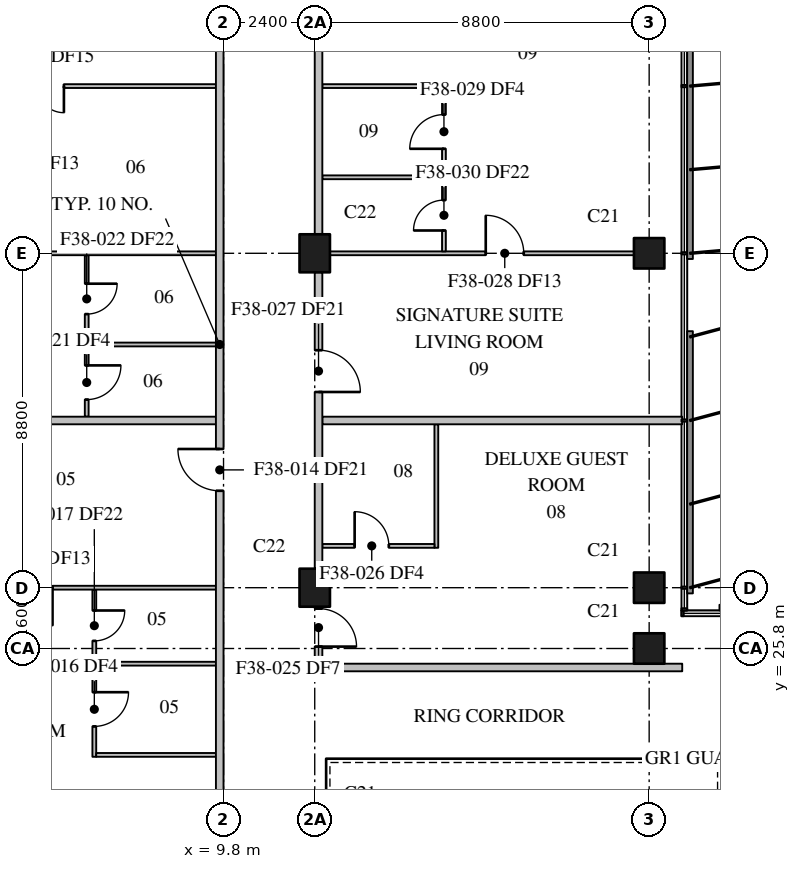
"""IFC4 building model, lengths in metres.
Left out: names, types, materials, properties, quantities, classifications, styles, units other than length and angle.
Written with IfcOpenShell. Run it as: python <this file> out.ifc"""

import sys

from ifc_helpers import new_model, si_unit, direction, frame, frame_2d, origin, origin_2d, place, context, subcontext, project, spatial, rectangle, extrude, element, fill, save


model = new_model("IFC4")
c1 = context("Model", 3, precision=1e-05, world=origin(), true_north=direction((0.0, 1.0)))
c2 = subcontext(c1, "Body", "Model", "MODEL_VIEW")
j1 = project(units=[si_unit("LENGTHUNIT", "METRE"), si_unit("PLANEANGLEUNIT", "RADIAN")], contexts=[c1])
p1 = place(None, origin())
s1 = spatial("IfcSite", under=j1, at=p1, CompositionType="ELEMENT")
p2 = place(p1, origin())
s2 = spatial("IfcBuilding", under=s1, at=p2, CompositionType="ELEMENT")
p3 = place(p2, frame((0.0, 0.0, 305.5)))
s3 = spatial("IfcBuildingStorey", under=s2, at=p3, CompositionType="ELEMENT", Elevation=305.5)
for number, where, z_axis, x_axis in (
    (1, (12.2, 27.4, 0.0), (0.0, 0.0, 1.0), (0.0, 1.0, 0.0)),
    (2, (12.2, 36.2, 0.0), (0.0, 0.0, 1.0), (0.0, 1.0, 0.0)),
):
    element("IfcColumn", number, at=place(p3, frame(where, z_axis=z_axis, x_axis=x_axis)), inside=s3, PredefinedType="COLUMN", context=c2, shape_type="SweptSolid", body=[
        extrude(rectangle(XDim=1.0, YDim=0.8, at=origin_2d()), origin(), (0.0, 0.0, 1.0), 3.7),
    ])
for number, where, z_axis, x_axis in (
    (3, (21.0, 25.8, 0.0), (0.0, 0.0, 1.0), (1.0, 0.0, 0.0)),
    (4, (21.0, 27.4, 0.0), (0.0, 0.0, 1.0), (1.0, 0.0, 0.0)),
    (5, (21.0, 36.2, 0.0), (0.0, 0.0, 1.0), (1.0, 0.0, 0.0)),
):
    element("IfcColumn", number, at=place(p3, frame(where, z_axis=z_axis, x_axis=x_axis)), inside=s3, PredefinedType="COLUMN", context=c2, shape_type="SweptSolid", body=[
        extrude(rectangle(XDim=0.8, YDim=0.8, at=origin_2d()), origin(), (0.0, 0.0, 1.0), 3.7),
    ])
p4 = place(p3, frame((9.7, 9.8, 0.0), z_axis=(0.0, 0.0, 1.0), x_axis=(0.0, 1.0, 0.0)))
e6 = element("IfcWall", 6, at=p4, inside=s3, PredefinedType="PARTITIONING", context=c2, shape_type="SweptSolid", body=[
    extrude(rectangle(XDim=48.0, YDim=0.2, at=frame_2d((24.0, 0.0))), origin(), (0.0, 0.0, 1.0), 3.25),
])
p5 = place(p4, frame((6.95, 0.0, 0.0)))
e7 = element("IfcOpeningElement", 7, at=p5, cuts=e6, PredefinedType="OPENING", context=c2, shape_type="SweptSolid", body=[
    extrude(rectangle(XDim=1.1, YDim=2.1, at=frame_2d((0.55, 1.05))), frame((0.0, 0.11, 0.0), z_axis=(0.0, -1.0, 0.0), x_axis=(1.0, 0.0, 0.0)), (0.0, 0.0, 1.0), 0.22),
])
p6 = place(p4, frame((20.15, 0.0, 0.0)))
e8 = element("IfcOpeningElement", 8, at=p6, cuts=e6, PredefinedType="OPENING", context=c2, shape_type="SweptSolid", body=[
    extrude(rectangle(XDim=1.1, YDim=2.1, at=frame_2d((0.55, 1.05))), frame((0.0, 0.11, 0.0), z_axis=(0.0, -1.0, 0.0), x_axis=(1.0, 0.0, 0.0)), (0.0, 0.0, 1.0), 0.22),
])
p7 = place(p4, frame((37.75, 0.0, 0.0)))
e9 = element("IfcOpeningElement", 9, at=p7, cuts=e6, PredefinedType="OPENING", context=c2, shape_type="SweptSolid", body=[
    extrude(rectangle(XDim=1.1, YDim=2.1, at=frame_2d((0.55, 1.05))), frame((0.0, 0.11, 0.0), z_axis=(0.0, -1.0, 0.0), x_axis=(1.0, 0.0, 0.0)), (0.0, 0.0, 1.0), 0.22),
])
p8 = place(p4, frame((41.2, 0.0, 0.0)))
e10 = element("IfcOpeningElement", 10, at=p8, cuts=e6, PredefinedType="OPENING", context=c2, shape_type="SweptSolid", body=[
    extrude(rectangle(XDim=1.1, YDim=2.1, at=frame_2d((0.55, 1.05))), frame((0.0, 0.11, 0.0), z_axis=(0.0, -1.0, 0.0), x_axis=(1.0, 0.0, 0.0)), (0.0, 0.0, 1.0), 0.22),
])
p9 = place(p3, frame((0.31, 31.8, 0.0), z_axis=(0.0, 0.0, 1.0), x_axis=(1.0, 0.0, 0.0)))
e11 = element("IfcWall", 11, at=p9, inside=s3, PredefinedType="PARTITIONING", context=c2, shape_type="SweptSolid", body=[
    extrude(rectangle(XDim=9.29, YDim=0.2, at=frame_2d((4.645, 0.0))), origin(), (0.0, 0.0, 1.0), 3.25),
])
p10 = place(p3, frame((12.4, 31.8, 0.0), z_axis=(0.0, 0.0, 1.0), x_axis=(1.0, 0.0, 0.0)))
e12 = element("IfcWall", 12, at=p10, inside=s3, PredefinedType="PARTITIONING", context=c2, shape_type="SweptSolid", body=[
    extrude(rectangle(XDim=9.47, YDim=0.2, at=frame_2d((4.735, 0.0))), origin(), (0.0, 0.0, 1.0), 3.25),
])
p11 = place(p3, frame((12.3, 26.9, 0.0), z_axis=(0.0, 0.0, 1.0), x_axis=(0.0, -1.0, 0.0)))
e13 = element("IfcWall", 13, at=p11, inside=s3, PredefinedType="PARTITIONING", context=c2, shape_type="SweptSolid", body=[
    extrude(rectangle(XDim=1.7, YDim=0.2, at=frame_2d((0.85, 0.0))), origin(), (0.0, 0.0, 1.0), 3.25),
])
p12 = place(p11, frame((0.05, 0.0, 0.0)))
e14 = element("IfcOpeningElement", 14, at=p12, cuts=e13, PredefinedType="OPENING", context=c2, shape_type="SweptSolid", body=[
    extrude(rectangle(XDim=1.0, YDim=2.1, at=frame_2d((0.5, 1.05))), frame((0.0, 0.11, 0.0), z_axis=(0.0, -1.0, 0.0), x_axis=(1.0, 0.0, 0.0)), (0.0, 0.0, 1.0), 0.22),
])
p13 = place(p3, frame((12.3, 35.7, 0.0), z_axis=(0.0, 0.0, 1.0), x_axis=(0.0, -1.0, 0.0)))
e15 = element("IfcWall", 15, at=p13, inside=s3, PredefinedType="PARTITIONING", context=c2, shape_type="SweptSolid", body=[
    extrude(rectangle(XDim=7.8, YDim=0.2, at=frame_2d((3.9, 0.0))), origin(), (0.0, 0.0, 1.0), 3.25),
])
p14 = place(p13, frame((2.05, 0.0, 0.0)))
e16 = element("IfcOpeningElement", 16, at=p14, cuts=e15, PredefinedType="OPENING", context=c2, shape_type="SweptSolid", body=[
    extrude(rectangle(XDim=1.1, YDim=2.1, at=frame_2d((0.55, 1.05))), frame((0.0, 0.11, 0.0), z_axis=(0.0, -1.0, 0.0), x_axis=(1.0, 0.0, 0.0)), (0.0, 0.0, 1.0), 0.22),
])
p15 = place(p3, frame((12.3, 36.7, 0.0), z_axis=(0.0, 0.0, 1.0), x_axis=(0.0, 1.0, 0.0)))
e17 = element("IfcWall", 17, at=p15, inside=s3, PredefinedType="PARTITIONING", context=c2, shape_type="SweptSolid", body=[
    extrude(rectangle(XDim=7.8, YDim=0.2, at=frame_2d((3.9, 0.0))), origin(), (0.0, 0.0, 1.0), 3.25),
])
p16 = place(p3, frame((12.4, 25.3, 0.0), z_axis=(0.0, 0.0, 1.0), x_axis=(1.0, 0.0, 0.0)))
e18 = element("IfcWall", 18, at=p16, inside=s3, PredefinedType="PARTITIONING", context=c2, shape_type="SweptSolid", body=[
    extrude(rectangle(XDim=9.47, YDim=0.2, at=frame_2d((4.735, 0.0))), origin(), (0.0, 0.0, 1.0), 3.25),
])
p17 = place(p3, frame((6.4, 27.35, 0.0), z_axis=(0.0, 0.0, 1.0), x_axis=(0.0, -1.0, 0.0)))
e19 = element("IfcWall", 19, at=p17, inside=s3, PredefinedType="PARTITIONING", context=c2, shape_type="SweptSolid", body=[
    extrude(rectangle(XDim=4.4, YDim=0.1, at=frame_2d((2.2, 0.0))), origin(), (0.0, 0.0, 1.0), 3.25),
])
p18 = place(p17, frame((2.7, 0.0, 0.0)))
e20 = element("IfcOpeningElement", 20, at=p18, cuts=e19, PredefinedType="OPENING", context=c2, shape_type="SweptSolid", body=[
    extrude(rectangle(XDim=0.9, YDim=2.1, at=frame_2d((0.45, 1.05))), frame((0.0, 0.06, 0.0), z_axis=(0.0, -1.0, 0.0), x_axis=(1.0, 0.0, 0.0)), (0.0, 0.0, 1.0), 0.12),
])
p19 = place(p17, frame((0.55, 0.0, 0.0)))
e21 = element("IfcOpeningElement", 21, at=p19, cuts=e19, PredefinedType="OPENING", context=c2, shape_type="SweptSolid", body=[
    extrude(rectangle(XDim=0.8, YDim=2.1, at=frame_2d((0.4, 1.05))), frame((0.0, 0.06, 0.0), z_axis=(0.0, -1.0, 0.0), x_axis=(1.0, 0.0, 0.0)), (0.0, 0.0, 1.0), 0.12),
])
p20 = place(p3, frame((9.6, 27.4, 0.0), z_axis=(0.0, 0.0, 1.0), x_axis=(-1.0, 0.0, 0.0)))
e22 = element("IfcWall", 22, at=p20, inside=s3, PredefinedType="PARTITIONING", context=c2, shape_type="SweptSolid", body=[
    extrude(rectangle(XDim=8.2, YDim=0.1, at=frame_2d((4.1, 0.0))), origin(), (0.0, 0.0, 1.0), 3.25),
])
p21 = place(p20, frame((4.3, 0.0, 0.0)))
e23 = element("IfcOpeningElement", 23, at=p21, cuts=e22, PredefinedType="OPENING", context=c2, shape_type="SweptSolid", body=[
    extrude(rectangle(XDim=1.0, YDim=2.1, at=frame_2d((0.5, 1.05))), frame((0.0, 0.06, 0.0), z_axis=(0.0, -1.0, 0.0), x_axis=(1.0, 0.0, 0.0)), (0.0, 0.0, 1.0), 0.12),
])
for number, where, z_axis, x_axis in (
    (24, (6.45, 23.0, 0.0), (0.0, 0.0, 1.0), (1.0, 0.0, 0.0)),
    (25, (6.45, 25.4, 0.0), (0.0, 0.0, 1.0), (1.0, 0.0, 0.0)),
):
    element("IfcWall", number, at=place(p3, frame(where, z_axis=z_axis, x_axis=x_axis)), inside=s3, PredefinedType="PARTITIONING", context=c2, shape_type="SweptSolid", body=[
        extrude(rectangle(XDim=3.15, YDim=0.1, at=frame_2d((1.575, 0.0))), origin(), (0.0, 0.0, 1.0), 3.25),
    ])
p22 = place(p3, frame((6.2, 36.15, 0.0), z_axis=(0.0, 0.0, 1.0), x_axis=(0.0, -1.0, 0.0)))
e26 = element("IfcWall", 26, at=p22, inside=s3, PredefinedType="PARTITIONING", context=c2, shape_type="SweptSolid", body=[
    extrude(rectangle(XDim=4.25, YDim=0.1, at=frame_2d((2.125, 0.0))), origin(), (0.0, 0.0, 1.0), 3.25),
])
p23 = place(p22, frame((2.9, 0.0, 0.0)))
e27 = element("IfcOpeningElement", 27, at=p23, cuts=e26, PredefinedType="OPENING", context=c2, shape_type="SweptSolid", body=[
    extrude(rectangle(XDim=0.9, YDim=2.1, at=frame_2d((0.45, 1.05))), frame((0.0, 0.06, 0.0), z_axis=(0.0, -1.0, 0.0), x_axis=(1.0, 0.0, 0.0)), (0.0, 0.0, 1.0), 0.12),
])
p24 = place(p22, frame((0.75, 0.0, 0.0)))
e28 = element("IfcOpeningElement", 28, at=p24, cuts=e26, PredefinedType="OPENING", context=c2, shape_type="SweptSolid", body=[
    extrude(rectangle(XDim=0.8, YDim=2.1, at=frame_2d((0.4, 1.05))), frame((0.0, 0.06, 0.0), z_axis=(0.0, -1.0, 0.0), x_axis=(1.0, 0.0, 0.0)), (0.0, 0.0, 1.0), 0.12),
])
p25 = place(p3, frame((9.6, 40.6, 0.0), z_axis=(0.0, 0.0, 1.0), x_axis=(-1.0, 0.0, 0.0)))
e29 = element("IfcWall", 29, at=p25, inside=s3, PredefinedType="PARTITIONING", context=c2, shape_type="SweptSolid", body=[
    extrude(rectangle(XDim=9.29, YDim=0.1, at=frame_2d((4.645, 0.0))), origin(), (0.0, 0.0, 1.0), 3.25),
])
p26 = place(p25, frame((4.0, 0.0, 0.0)))
e30 = element("IfcOpeningElement", 30, at=p26, cuts=e29, PredefinedType="OPENING", context=c2, shape_type="SweptSolid", body=[
    extrude(rectangle(XDim=1.4, YDim=2.1, at=frame_2d((0.7, 1.05))), frame((0.0, 0.06, 0.0), z_axis=(0.0, -1.0, 0.0), x_axis=(1.0, 0.0, 0.0)), (0.0, 0.0, 1.0), 0.12),
])
p27 = place(p3, frame((12.4, 40.6, 0.0), z_axis=(0.0, 0.0, 1.0), x_axis=(1.0, 0.0, 0.0)))
e31 = element("IfcWall", 31, at=p27, inside=s3, PredefinedType="PARTITIONING", context=c2, shape_type="SweptSolid", body=[
    extrude(rectangle(XDim=3.15, YDim=0.1, at=frame_2d((1.575, 0.0))), origin(), (0.0, 0.0, 1.0), 3.25),
])
p28 = place(p3, frame((9.6, 36.2, 0.0), z_axis=(0.0, 0.0, 1.0), x_axis=(-1.0, 0.0, 0.0)))
e32 = element("IfcWall", 32, at=p28, inside=s3, PredefinedType="PARTITIONING", context=c2, shape_type="SweptSolid", body=[
    extrude(rectangle(XDim=8.2, YDim=0.1, at=frame_2d((4.1, 0.0))), origin(), (0.0, 0.0, 1.0), 3.25),
])
p29 = place(p28, frame((4.6, 0.0, 0.0)))
e33 = element("IfcOpeningElement", 33, at=p29, cuts=e32, PredefinedType="OPENING", context=c2, shape_type="SweptSolid", body=[
    extrude(rectangle(XDim=1.0, YDim=2.1, at=frame_2d((0.5, 1.05))), frame((0.0, 0.06, 0.0), z_axis=(0.0, -1.0, 0.0), x_axis=(1.0, 0.0, 0.0)), (0.0, 0.0, 1.0), 0.12),
])
p30 = place(p3, frame((12.6, 36.2, 0.0), z_axis=(0.0, 0.0, 1.0), x_axis=(1.0, 0.0, 0.0)))
e34 = element("IfcWall", 34, at=p30, inside=s3, PredefinedType="PARTITIONING", context=c2, shape_type="SweptSolid", body=[
    extrude(rectangle(XDim=8.0, YDim=0.1, at=frame_2d((4.0, 0.0))), origin(), (0.0, 0.0, 1.0), 3.25),
])
p31 = place(p30, frame((4.1, 0.0, 0.0)))
e35 = element("IfcOpeningElement", 35, at=p31, cuts=e34, PredefinedType="OPENING", context=c2, shape_type="SweptSolid", body=[
    extrude(rectangle(XDim=1.0, YDim=2.1, at=frame_2d((0.5, 1.05))), frame((0.0, 0.06, 0.0), z_axis=(0.0, -1.0, 0.0), x_axis=(1.0, 0.0, 0.0)), (0.0, 0.0, 1.0), 0.12),
])
p32 = place(p3, frame((6.25, 33.8, 0.0), z_axis=(0.0, 0.0, 1.0), x_axis=(1.0, 0.0, 0.0)))
e36 = element("IfcWall", 36, at=p32, inside=s3, PredefinedType="PARTITIONING", context=c2, shape_type="SweptSolid", body=[
    extrude(rectangle(XDim=3.35, YDim=0.1, at=frame_2d((1.675, 0.0))), origin(), (0.0, 0.0, 1.0), 3.25),
])
p33 = place(p3, frame((15.4, 28.45, 0.0), z_axis=(0.0, 0.0, 1.0), x_axis=(0.0, 1.0, 0.0)))
e37 = element("IfcWall", 37, at=p33, inside=s3, PredefinedType="PARTITIONING", context=c2, shape_type="SweptSolid", body=[
    extrude(rectangle(XDim=3.25, YDim=0.1, at=frame_2d((1.625, 0.0))), origin(), (0.0, 0.0, 1.0), 3.25),
])
p34 = place(p3, frame((12.4, 28.5, 0.0), z_axis=(0.0, 0.0, 1.0), x_axis=(1.0, 0.0, 0.0)))
e38 = element("IfcWall", 38, at=p34, inside=s3, PredefinedType="PARTITIONING", context=c2, shape_type="SweptSolid", body=[
    extrude(rectangle(XDim=2.95, YDim=0.1, at=frame_2d((1.475, 0.0))), origin(), (0.0, 0.0, 1.0), 3.25),
])
p35 = place(p34, frame((0.85, 0.0, 0.0)))
e39 = element("IfcOpeningElement", 39, at=p35, cuts=e38, PredefinedType="OPENING", context=c2, shape_type="SweptSolid", body=[
    extrude(rectangle(XDim=0.9, YDim=2.1, at=frame_2d((0.45, 1.05))), frame((0.0, 0.06, 0.0), z_axis=(0.0, -1.0, 0.0), x_axis=(1.0, 0.0, 0.0)), (0.0, 0.0, 1.0), 0.12),
])
p36 = place(p3, frame((15.6, 36.25, 0.0), z_axis=(0.0, 0.0, 1.0), x_axis=(0.0, 1.0, 0.0)))
e40 = element("IfcWall", 40, at=p36, inside=s3, PredefinedType="PARTITIONING", context=c2, shape_type="SweptSolid", body=[
    extrude(rectangle(XDim=4.4, YDim=0.1, at=frame_2d((2.2, 0.0))), origin(), (0.0, 0.0, 1.0), 3.25),
])
p37 = place(p36, frame((2.7, 0.0, 0.0)))
e41 = element("IfcOpeningElement", 41, at=p37, cuts=e40, PredefinedType="OPENING", context=c2, shape_type="SweptSolid", body=[
    extrude(rectangle(XDim=0.9, YDim=2.1, at=frame_2d((0.45, 1.05))), frame((0.0, 0.06, 0.0), z_axis=(0.0, -1.0, 0.0), x_axis=(1.0, 0.0, 0.0)), (0.0, 0.0, 1.0), 0.12),
])
p38 = place(p36, frame((0.55, 0.0, 0.0)))
e42 = element("IfcOpeningElement", 42, at=p38, cuts=e40, PredefinedType="OPENING", context=c2, shape_type="SweptSolid", body=[
    extrude(rectangle(XDim=0.8, YDim=2.1, at=frame_2d((0.4, 1.05))), frame((0.0, 0.06, 0.0), z_axis=(0.0, -1.0, 0.0), x_axis=(1.0, 0.0, 0.0)), (0.0, 0.0, 1.0), 0.12),
])
p39 = place(p3, frame((12.4, 38.2, 0.0), z_axis=(0.0, 0.0, 1.0), x_axis=(1.0, 0.0, 0.0)))
e43 = element("IfcWall", 43, at=p39, inside=s3, PredefinedType="PARTITIONING", context=c2, shape_type="SweptSolid", body=[
    extrude(rectangle(XDim=3.15, YDim=0.1, at=frame_2d((1.575, 0.0))), origin(), (0.0, 0.0, 1.0), 3.25),
])
p40 = place(p6, origin())
e44 = element("IfcDoor", 44, at=p40, inside=s3, OperationType="SINGLE_SWING_RIGHT", PredefinedType="DOOR", context=c2, shape_type="SweptSolid", body=[
    extrude(rectangle(XDim=1.1, YDim=2.1, at=frame_2d((0.55, 1.05))), frame((0.0, 0.025, 0.0), z_axis=(0.0, -1.0, 0.0), x_axis=(1.0, 0.0, 0.0)), (0.0, 0.0, 1.0), 0.05),
])
fill(e8, e44)
p41 = place(p18, origin())
e45 = element("IfcDoor", 45, at=p41, inside=s3, OperationType="SINGLE_SWING_LEFT", PredefinedType="DOOR", context=c2, shape_type="SweptSolid", body=[
    extrude(rectangle(XDim=0.9, YDim=2.1, at=frame_2d((0.45, 1.05))), frame((0.0, 0.025, 0.0), z_axis=(0.0, -1.0, 0.0), x_axis=(1.0, 0.0, 0.0)), (0.0, 0.0, 1.0), 0.05),
])
fill(e20, e45)
p42 = place(p19, origin())
e46 = element("IfcDoor", 46, at=p42, inside=s3, OperationType="SINGLE_SWING_LEFT", PredefinedType="DOOR", context=c2, shape_type="SweptSolid", body=[
    extrude(rectangle(XDim=0.8, YDim=2.1, at=frame_2d((0.4, 1.05))), frame((0.0, 0.025, 0.0), z_axis=(0.0, -1.0, 0.0), x_axis=(1.0, 0.0, 0.0)), (0.0, 0.0, 1.0), 0.05),
])
fill(e21, e46)
p43 = place(p26, origin())
e47 = element("IfcDoor", 47, at=p43, inside=s3, OperationType="DOUBLE_DOOR_SINGLE_SWING", PredefinedType="DOOR", context=c2, shape_type="SweptSolid", body=[
    extrude(rectangle(XDim=1.4, YDim=2.1, at=frame_2d((0.7, 1.05))), frame((0.0, 0.025, 0.0), z_axis=(0.0, -1.0, 0.0), x_axis=(1.0, 0.0, 0.0)), (0.0, 0.0, 1.0), 0.05),
])
fill(e30, e47)
p44 = place(p23, origin())
e48 = element("IfcDoor", 48, at=p44, inside=s3, OperationType="SINGLE_SWING_LEFT", PredefinedType="DOOR", context=c2, shape_type="SweptSolid", body=[
    extrude(rectangle(XDim=0.9, YDim=2.1, at=frame_2d((0.45, 1.05))), frame((0.0, 0.025, 0.0), z_axis=(0.0, -1.0, 0.0), x_axis=(1.0, 0.0, 0.0)), (0.0, 0.0, 1.0), 0.05),
])
fill(e27, e48)
p45 = place(p24, origin())
e49 = element("IfcDoor", 49, at=p45, inside=s3, OperationType="SINGLE_SWING_LEFT", PredefinedType="DOOR", context=c2, shape_type="SweptSolid", body=[
    extrude(rectangle(XDim=0.8, YDim=2.1, at=frame_2d((0.4, 1.05))), frame((0.0, 0.025, 0.0), z_axis=(0.0, -1.0, 0.0), x_axis=(1.0, 0.0, 0.0)), (0.0, 0.0, 1.0), 0.05),
])
fill(e28, e49)
p46 = place(p12, origin())
e50 = element("IfcDoor", 50, at=p46, inside=s3, OperationType="SINGLE_SWING_RIGHT", PredefinedType="DOOR", context=c2, shape_type="SweptSolid", body=[
    extrude(rectangle(XDim=1.0, YDim=2.1, at=frame_2d((0.5, 1.05))), frame((0.0, 0.025, 0.0), z_axis=(0.0, -1.0, 0.0), x_axis=(1.0, 0.0, 0.0)), (0.0, 0.0, 1.0), 0.05),
])
fill(e14, e50)
p47 = place(p35, origin())
e51 = element("IfcDoor", 51, at=p47, inside=s3, OperationType="SINGLE_SWING_LEFT", PredefinedType="DOOR", context=c2, shape_type="SweptSolid", body=[
    extrude(rectangle(XDim=0.9, YDim=2.1, at=frame_2d((0.45, 1.05))), frame((0.0, 0.025, 0.0), z_axis=(0.0, -1.0, 0.0), x_axis=(1.0, 0.0, 0.0)), (0.0, 0.0, 1.0), 0.05),
])
fill(e39, e51)
p48 = place(p14, origin())
e52 = element("IfcDoor", 52, at=p48, inside=s3, OperationType="SINGLE_SWING_RIGHT", PredefinedType="DOOR", context=c2, shape_type="SweptSolid", body=[
    extrude(rectangle(XDim=1.1, YDim=2.1, at=frame_2d((0.55, 1.05))), frame((0.0, 0.025, 0.0), z_axis=(0.0, -1.0, 0.0), x_axis=(1.0, 0.0, 0.0)), (0.0, 0.0, 1.0), 0.05),
])
fill(e16, e52)
p49 = place(p31, origin())
e53 = element("IfcDoor", 53, at=p49, inside=s3, OperationType="SINGLE_SWING_LEFT", PredefinedType="DOOR", context=c2, shape_type="SweptSolid", body=[
    extrude(rectangle(XDim=1.0, YDim=2.1, at=frame_2d((0.5, 1.05))), frame((0.0, 0.025, 0.0), z_axis=(0.0, -1.0, 0.0), x_axis=(1.0, 0.0, 0.0)), (0.0, 0.0, 1.0), 0.05),
])
fill(e35, e53)
p50 = place(p37, origin())
e54 = element("IfcDoor", 54, at=p50, inside=s3, OperationType="SINGLE_SWING_LEFT", PredefinedType="DOOR", context=c2, shape_type="SweptSolid", body=[
    extrude(rectangle(XDim=0.9, YDim=2.1, at=frame_2d((0.45, 1.05))), frame((0.0, 0.025, 0.0), z_axis=(0.0, -1.0, 0.0), x_axis=(1.0, 0.0, 0.0)), (0.0, 0.0, 1.0), 0.05),
])
fill(e41, e54)
p51 = place(p38, origin())
e55 = element("IfcDoor", 55, at=p51, inside=s3, OperationType="SINGLE_SWING_LEFT", PredefinedType="DOOR", context=c2, shape_type="SweptSolid", body=[
    extrude(rectangle(XDim=0.8, YDim=2.1, at=frame_2d((0.4, 1.05))), frame((0.0, 0.025, 0.0), z_axis=(0.0, -1.0, 0.0), x_axis=(1.0, 0.0, 0.0)), (0.0, 0.0, 1.0), 0.05),
])
fill(e42, e55)
save(model, sys.argv[1])
